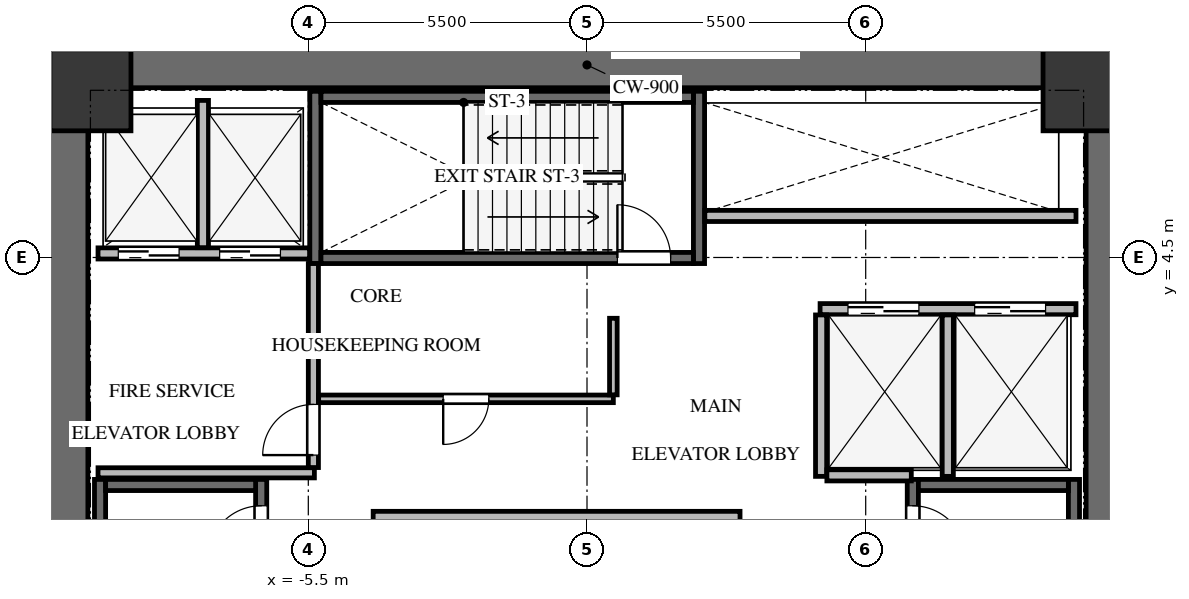
"""IFC4 building model, lengths in metres.
Left out: names, types, materials, properties, quantities, classifications, styles, units other than length and angle.
Written with IfcOpenShell. Run it as: python <this file> out.ifc"""

import sys

from ifc_helpers import new_model, si_unit, direction, frame, frame_2d, origin, origin_2d, place, context, subcontext, project, spatial, rectangle, extrude, source, transform, mapped, element, fill, save


model = new_model("IFC4")
c1 = context("Model", 3, precision=1e-05, world=origin(), true_north=direction((0.0, 1.0)))
c2 = subcontext(c1, "Body", "Model", "MODEL_VIEW")
j1 = project(units=[si_unit("LENGTHUNIT", "METRE"), si_unit("PLANEANGLEUNIT", "RADIAN")], contexts=[c1])
p1 = place(None, origin())
s1 = spatial("IfcSite", under=j1, at=p1, CompositionType="ELEMENT")
p2 = place(p1, origin())
s2 = spatial("IfcBuilding", under=s1, at=p2, CompositionType="ELEMENT")
p3 = place(p2, frame((0.0, 0.0, 84.3)))
s3 = spatial("IfcBuildingStorey", under=s2, at=p3, CompositionType="ELEMENT", Elevation=84.3)
for number, where, z_axis, x_axis in (
    (1, (-10.3, -8.75, 0.0), (0.0, 0.0, 1.0), (0.0, 1.0, 0.0)),
    (2, (10.3, -8.75, 0.0), (0.0, 0.0, 1.0), (0.0, 1.0, 0.0)),
):
    element("IfcWall", number, at=place(p3, frame(where, z_axis=z_axis, x_axis=x_axis)), inside=s3, PredefinedType="SHEAR", context=c2, shape_type="SweptSolid", body=[
        extrude(rectangle(XDim=17.5, YDim=0.9, at=frame_2d((8.75, 0.0))), origin(), (0.0, 0.0, 1.0), 4.2),
    ])
p4 = place(p3, frame((-9.85, 8.3, 0.0), z_axis=(0.0, 0.0, 1.0), x_axis=(1.0, 0.0, 0.0)))
e3 = element("IfcWall", 3, at=p4, inside=s3, PredefinedType="SHEAR", context=c2, shape_type="SweptSolid", body=[
    extrude(rectangle(XDim=19.7, YDim=0.9, at=frame_2d((9.85, 0.0))), origin(), (0.0, 0.0, 1.0), 4.2),
])
p5 = place(p3, frame((-6.43, -7.77, -0.24), z_axis=(0.0, 0.0, 1.0), x_axis=(0.0, 1.0, 0.0)))
e4 = element("IfcWall", 4, at=p5, inside=s3, PredefinedType="SHEAR", context=c2, shape_type="SweptSolid", body=[
    extrude(rectangle(XDim=7.89, YDim=0.22, at=frame_2d((3.945, 0.0))), origin(), (0.0, 0.0, 1.0), 4.14),
])
p6 = place(p5, frame((6.32, 0.0, 0.0)))
e5 = element("IfcOpeningElement", 5, at=p6, cuts=e4, PredefinedType="OPENING", context=c2, shape_type="SweptSolid", body=[
    extrude(rectangle(XDim=1.05, YDim=2.15, at=frame_2d((0.525, 1.075))), frame((0.0, 0.12, 0.0), z_axis=(0.0, -1.0, 0.0), x_axis=(1.0, 0.0, 0.0)), (0.0, 0.0, 1.0), 0.24),
])
p7 = place(p3, frame((-9.61, 0.12, -0.24), z_axis=(0.0, 0.0, 1.0), x_axis=(0.0, -1.0, 0.0)))
e6 = element("IfcWall", 6, at=p7, inside=s3, PredefinedType="SHEAR", context=c2, shape_type="SweptSolid", body=[
    extrude(rectangle(XDim=7.89, YDim=0.22, at=frame_2d((3.945, 0.0))), origin(), (0.0, 0.0, 1.0), 4.14),
])
p8 = place(p3, frame((-6.54, 0.01, -0.24), z_axis=(0.0, 0.0, 1.0), x_axis=(-1.0, 0.0, 0.0)))
e7 = element("IfcWall", 7, at=p8, inside=s3, PredefinedType="SHEAR", context=c2, shape_type="SweptSolid", body=[
    extrude(rectangle(XDim=2.96, YDim=0.22, at=frame_2d((1.48, 0.0))), origin(), (0.0, 0.0, 1.0), 4.14),
])
p9 = place(p3, frame((9.61, -7.77, -0.24), z_axis=(0.0, 0.0, 1.0), x_axis=(0.0, 1.0, 0.0)))
e8 = element("IfcWall", 8, at=p9, inside=s3, PredefinedType="SHEAR", context=c2, shape_type="SweptSolid", body=[
    extrude(rectangle(XDim=7.89, YDim=0.22, at=frame_2d((3.945, 0.0))), origin(), (0.0, 0.0, 1.0), 4.14),
])
p10 = place(p3, frame((6.43, 0.12, -0.24), z_axis=(0.0, 0.0, 1.0), x_axis=(0.0, -1.0, 0.0)))
e9 = element("IfcWall", 9, at=p10, inside=s3, PredefinedType="SHEAR", context=c2, shape_type="SweptSolid", body=[
    extrude(rectangle(XDim=7.89, YDim=0.22, at=frame_2d((3.945, 0.0))), origin(), (0.0, 0.0, 1.0), 4.14),
])
p11 = place(p10, frame((0.52, 0.0, 0.0)))
e10 = element("IfcOpeningElement", 10, at=p11, cuts=e9, PredefinedType="OPENING", context=c2, shape_type="SweptSolid", body=[
    extrude(rectangle(XDim=1.05, YDim=2.15, at=frame_2d((0.525, 1.075))), frame((0.0, 0.12, 0.0), z_axis=(0.0, -1.0, 0.0), x_axis=(1.0, 0.0, 0.0)), (0.0, 0.0, 1.0), 0.24),
])
p12 = place(p3, frame((9.5, 0.01, -0.24), z_axis=(0.0, 0.0, 1.0), x_axis=(-1.0, 0.0, 0.0)))
e11 = element("IfcWall", 11, at=p12, inside=s3, PredefinedType="SHEAR", context=c2, shape_type="SweptSolid", body=[
    extrude(rectangle(XDim=2.96, YDim=0.22, at=frame_2d((1.48, 0.0))), origin(), (0.0, 0.0, 1.0), 4.14),
])
for number, where, z_axis, x_axis in (
    (12, (2.21, 4.38, -0.24), (0.0, 0.0, 1.0), (0.0, 1.0, 0.0)),
    (13, (-5.36, 7.78, -0.24), (0.0, 0.0, 1.0), (0.0, -1.0, 0.0)),
):
    element("IfcWall", number, at=place(p3, frame(where, z_axis=z_axis, x_axis=x_axis)), inside=s3, PredefinedType="SHEAR", context=c2, shape_type="SweptSolid", body=[
        extrude(rectangle(XDim=3.4, YDim=0.22, at=frame_2d((1.7, 0.0))), origin(), (0.0, 0.0, 1.0), 4.14),
    ])
p13 = place(p3, frame((-5.25, 4.49, -0.24), z_axis=(0.0, 0.0, 1.0), x_axis=(1.0, 0.0, 0.0)))
e14 = element("IfcWall", 14, at=p13, inside=s3, PredefinedType="SHEAR", context=c2, shape_type="SweptSolid", body=[
    extrude(rectangle(XDim=7.35, YDim=0.22, at=frame_2d((3.675, 0.0))), origin(), (0.0, 0.0, 1.0), 4.14),
])
p14 = place(p13, frame((5.85, 0.0, 0.0)))
e15 = element("IfcOpeningElement", 15, at=p14, cuts=e14, PredefinedType="OPENING", context=c2, shape_type="SweptSolid", body=[
    extrude(rectangle(XDim=1.05, YDim=2.15, at=frame_2d((0.525, 1.075))), frame((0.0, 0.12, 0.0), z_axis=(0.0, -1.0, 0.0), x_axis=(1.0, 0.0, 0.0)), (0.0, 0.0, 1.0), 0.24),
])
p15 = place(p3, frame((2.1, 7.67, -0.24), z_axis=(0.0, 0.0, 1.0), x_axis=(-1.0, 0.0, 0.0)))
e16 = element("IfcWall", 16, at=p15, inside=s3, PredefinedType="SHEAR", context=c2, shape_type="SweptSolid", body=[
    extrude(rectangle(XDim=7.35, YDim=0.22, at=frame_2d((3.675, 0.0))), origin(), (0.0, 0.0, 1.0), 4.14),
])
m1 = source(origin(), c2, "Body", "SweptSolid", [
    extrude(rectangle(XDim=1.6, YDim=1.6, at=origin_2d()), origin(), (0.0, 0.0, 1.0), 4.14),
])
for number, where, z_axis, x_axis in (
    (17, (9.8, 7.8, -0.24), (0.0, 0.0, 1.0), (1.0, 0.0, 0.0)),
    (18, (-9.8, 7.8, -0.24), (0.0, 0.0, 1.0), (1.0, 0.0, 0.0)),
):
    element("IfcColumn", number, at=place(p3, frame(where, z_axis=z_axis, x_axis=x_axis)), inside=s3, PredefinedType="COLUMN", context=c2, shape_type="MappedRepresentation", body=[
        mapped(m1, transform((0.0, 0.0, 0.0), x_axis=(1.0, 0.0, 0.0), y_axis=(0.0, 1.0, 0.0), z_axis=(0.0, 0.0, 1.0), scale=1.0)),
    ])
p16 = place(p3, frame((-9.65, 4.58, 0.0), z_axis=(0.0, 0.0, 1.0), x_axis=(1.0, 0.0, 0.0)))
e19 = element("IfcWall", 19, at=p16, inside=s3, PredefinedType="SOLIDWALL", context=c2, shape_type="SweptSolid", body=[
    extrude(rectangle(XDim=4.175, YDim=0.22, at=frame_2d((2.087, 0.0))), origin(), (0.0, 0.0, 1.0), 3.885),
])
p17 = place(p16, frame((0.4, 0.0, 0.0)))
e20 = element("IfcOpeningElement", 20, at=p17, cuts=e19, PredefinedType="OPENING", context=c2, shape_type="SweptSolid", body=[
    extrude(rectangle(XDim=1.2, YDim=2.15, at=frame_2d((0.6, 1.075))), frame((0.0, 0.12, 0.0), z_axis=(0.0, -1.0, 0.0), x_axis=(1.0, 0.0, 0.0)), (0.0, 0.0, 1.0), 0.24),
])
p18 = place(p16, frame((2.4, 0.0, 0.0)))
e21 = element("IfcOpeningElement", 21, at=p18, cuts=e19, PredefinedType="OPENING", context=c2, shape_type="SweptSolid", body=[
    extrude(rectangle(XDim=1.2, YDim=2.15, at=frame_2d((0.6, 1.075))), frame((0.0, 0.12, 0.0), z_axis=(0.0, -1.0, 0.0), x_axis=(1.0, 0.0, 0.0)), (0.0, 0.0, 1.0), 0.24),
])
p19 = place(p3, frame((-7.58, 4.694, 0.0), z_axis=(0.0, 0.0, 1.0), x_axis=(0.0, 1.0, 0.0)))
e22 = element("IfcWall", 22, at=p19, inside=s3, PredefinedType="SOLIDWALL", context=c2, shape_type="SweptSolid", body=[
    extrude(rectangle(XDim=2.906, YDim=0.22, at=frame_2d((1.453, 0.0))), origin(), (0.0, 0.0, 1.0), 3.885),
])
p20 = place(p3, frame((-9.65, 0.25, 0.0), z_axis=(0.0, 0.0, 1.0), x_axis=(1.0, 0.0, 0.0)))
e23 = element("IfcWall", 23, at=p20, inside=s3, PredefinedType="SOLIDWALL", context=c2, shape_type="SweptSolid", body=[
    extrude(rectangle(XDim=4.27, YDim=0.2, at=frame_2d((2.135, 0.0))), origin(), (0.0, 0.0, 1.0), 3.885),
])
p21 = place(p3, frame((-5.4, 0.354, 0.0), z_axis=(0.0, 0.0, 1.0), x_axis=(0.0, 1.0, 0.0)))
e24 = element("IfcWall", 24, at=p21, inside=s3, PredefinedType="SOLIDWALL", context=c2, shape_type="SweptSolid", body=[
    extrude(rectangle(XDim=4.026, YDim=0.2, at=frame_2d((2.013, 0.0))), origin(), (0.0, 0.0, 1.0), 3.885),
])
p22 = place(p21, frame((0.246, 0.0, 0.0)))
e25 = element("IfcOpeningElement", 25, at=p22, cuts=e24, PredefinedType="OPENING", context=c2, shape_type="SweptSolid", body=[
    extrude(rectangle(XDim=1.0, YDim=2.15, at=frame_2d((0.5, 1.075))), frame((0.0, 0.11, 0.0), z_axis=(0.0, -1.0, 0.0), x_axis=(1.0, 0.0, 0.0)), (0.0, 0.0, 1.0), 0.22),
])
p23 = place(p3, frame((4.6, 3.48, 0.0), z_axis=(0.0, 0.0, 1.0), x_axis=(1.0, 0.0, 0.0)))
e26 = element("IfcWall", 26, at=p23, inside=s3, PredefinedType="SOLIDWALL", context=c2, shape_type="SweptSolid", body=[
    extrude(rectangle(XDim=5.05, YDim=0.22, at=frame_2d((2.525, 0.0))), origin(), (0.0, 0.0, 1.0), 3.885),
])
p24 = place(p23, frame((0.55, 0.0, 0.0)))
e27 = element("IfcOpeningElement", 27, at=p24, cuts=e26, PredefinedType="OPENING", context=c2, shape_type="SweptSolid", body=[
    extrude(rectangle(XDim=1.4, YDim=2.15, at=frame_2d((0.7, 1.075))), frame((0.0, 0.12, 0.0), z_axis=(0.0, -1.0, 0.0), x_axis=(1.0, 0.0, 0.0)), (0.0, 0.0, 1.0), 0.24),
])
p25 = place(p23, frame((3.05, 0.0, 0.0)))
e28 = element("IfcOpeningElement", 28, at=p25, cuts=e26, PredefinedType="OPENING", context=c2, shape_type="SweptSolid", body=[
    extrude(rectangle(XDim=1.4, YDim=2.15, at=frame_2d((0.7, 1.075))), frame((0.0, 0.12, 0.0), z_axis=(0.0, -1.0, 0.0), x_axis=(1.0, 0.0, 0.0)), (0.0, 0.0, 1.0), 0.24),
])
for number, where, z_axis, x_axis in (
    (29, (4.62, 0.18, 0.0), (0.0, 0.0, 1.0), (0.0, 1.0, 0.0)),
    (30, (7.12, 0.18, 0.0), (0.0, 0.0, 1.0), (0.0, 1.0, 0.0)),
):
    element("IfcWall", number, at=place(p3, frame(where, z_axis=z_axis, x_axis=x_axis)), inside=s3, PredefinedType="SOLIDWALL", context=c2, shape_type="SweptSolid", body=[
        extrude(rectangle(XDim=3.186, YDim=0.22, at=frame_2d((1.593, 0.0))), origin(), (0.0, 0.0, 1.0), 3.885),
    ])
p26 = place(p3, frame((4.734, 0.2, 0.0), z_axis=(0.0, 0.0, 1.0), x_axis=(1.0, 0.0, 0.0)))
e31 = element("IfcWall", 31, at=p26, inside=s3, PredefinedType="SOLIDWALL", context=c2, shape_type="SweptSolid", body=[
    extrude(rectangle(XDim=1.666, YDim=0.22, at=frame_2d((0.833, 0.0))), origin(), (0.0, 0.0, 1.0), 3.885),
])
p27 = place(p3, frame((-4.22, -0.62, 0.0), z_axis=(0.0, 0.0, 1.0), x_axis=(1.0, 0.0, 0.0)))
e32 = element("IfcWall", 32, at=p27, inside=s3, PredefinedType="SOLIDWALL", context=c2, shape_type="SweptSolid", body=[
    extrude(rectangle(XDim=7.24, YDim=0.22, at=frame_2d((3.62, 0.0))), origin(), (0.0, 0.0, 1.0), 3.885),
])
p28 = place(p3, frame((2.325, 5.32, 0.0), z_axis=(0.0, 0.0, 1.0), x_axis=(1.0, 0.0, 0.0)))
e33 = element("IfcWall", 33, at=p28, inside=s3, PredefinedType="SOLIDWALL", context=c2, shape_type="SweptSolid", body=[
    extrude(rectangle(XDim=7.325, YDim=0.22, at=frame_2d((3.663, 0.0))), origin(), (0.0, 0.0, 1.0), 3.885),
])
p29 = place(p3, frame((0.52, 1.71, 0.0), z_axis=(0.0, 0.0, 1.0), x_axis=(-1.0, 0.0, 0.0)))
e34 = element("IfcWall", 34, at=p29, inside=s3, PredefinedType="PARTITIONING", context=c2, shape_type="SweptSolid", body=[
    extrude(rectangle(XDim=5.816, YDim=0.15, at=frame_2d((2.908, 0.0))), origin(), (0.0, 0.0, 1.0), 3.885),
])
p30 = place(p29, frame((2.458, 0.0, 0.0)))
e35 = element("IfcOpeningElement", 35, at=p30, cuts=e34, PredefinedType="OPENING", context=c2, shape_type="SweptSolid", body=[
    extrude(rectangle(XDim=0.9, YDim=2.05, at=frame_2d((0.45, 1.025))), frame((0.0, 0.085, 0.0), z_axis=(0.0, -1.0, 0.0), x_axis=(1.0, 0.0, 0.0)), (0.0, 0.0, 1.0), 0.17),
])
p31 = place(p3, frame((0.52, 3.3, 0.0), z_axis=(0.0, 0.0, 1.0), x_axis=(0.0, -1.0, 0.0)))
e36 = element("IfcWall", 36, at=p31, inside=s3, PredefinedType="PARTITIONING", context=c2, shape_type="SweptSolid", body=[
    extrude(rectangle(XDim=1.511, YDim=0.15, at=frame_2d((0.755, 0.0))), origin(), (0.0, 0.0, 1.0), 3.885),
])
m2 = source(origin(), c2, "Body", "SweptSolid", [
    extrude(rectangle(XDim=1.05, YDim=2.15, at=frame_2d((0.525, 1.075))), frame((0.0, 0.025, 0.0), z_axis=(0.0, -1.0, 0.0), x_axis=(1.0, 0.0, 0.0)), (0.0, 0.0, 1.0), 0.05),
])
p32 = place(p6, origin())
e37 = element("IfcDoor", 37, at=p32, inside=s3, OperationType="SINGLE_SWING_LEFT", PredefinedType="DOOR", context=c2, shape_type="MappedRepresentation", body=[
    mapped(m2, transform((0.0, 0.0, 0.0), x_axis=(1.0, 0.0, 0.0), y_axis=(0.0, 1.0, 0.0), z_axis=(0.0, 0.0, 1.0), scale=1.0)),
])
fill(e5, e37)
m3 = source(origin(), c2, "Body", "SweptSolid", [
    extrude(rectangle(XDim=1.05, YDim=2.15, at=frame_2d((0.525, 1.075))), frame((0.0, 0.025, 0.0), z_axis=(0.0, -1.0, 0.0), x_axis=(1.0, 0.0, 0.0)), (0.0, 0.0, 1.0), 0.05),
])
p33 = place(p11, origin())
e38 = element("IfcDoor", 38, at=p33, inside=s3, OperationType="SINGLE_SWING_RIGHT", PredefinedType="DOOR", context=c2, shape_type="MappedRepresentation", body=[
    mapped(m3, transform((0.0, 0.0, 0.0), x_axis=(1.0, 0.0, 0.0), y_axis=(0.0, 1.0, 0.0), z_axis=(0.0, 0.0, 1.0), scale=1.0)),
])
fill(e10, e38)
p34 = place(p14, origin())
e39 = element("IfcDoor", 39, at=p34, inside=s3, OperationType="SINGLE_SWING_LEFT", PredefinedType="DOOR", context=c2, shape_type="MappedRepresentation", body=[
    mapped(m2, transform((0.0, 0.0, 0.0), x_axis=(1.0, 0.0, 0.0), y_axis=(0.0, 1.0, 0.0), z_axis=(0.0, 0.0, 1.0), scale=1.0)),
])
fill(e15, e39)
m4 = source(origin(), c2, "Body", "SweptSolid", [
    extrude(rectangle(XDim=1.2, YDim=2.15, at=frame_2d((0.6, 1.075))), frame((0.0, 0.025, 0.0), z_axis=(0.0, -1.0, 0.0), x_axis=(1.0, 0.0, 0.0)), (0.0, 0.0, 1.0), 0.05),
])
p35 = place(p17, origin())
e40 = element("IfcDoor", 40, at=p35, inside=s3, OperationType="DOUBLE_DOOR_SLIDING", PredefinedType="DOOR", context=c2, shape_type="MappedRepresentation", body=[
    mapped(m4, transform((0.0, 0.0, 0.0), x_axis=(1.0, 0.0, 0.0), y_axis=(0.0, 1.0, 0.0), z_axis=(0.0, 0.0, 1.0), scale=1.0)),
])
fill(e20, e40)
p36 = place(p18, origin())
e41 = element("IfcDoor", 41, at=p36, inside=s3, OperationType="DOUBLE_DOOR_SLIDING", PredefinedType="DOOR", context=c2, shape_type="MappedRepresentation", body=[
    mapped(m4, transform((0.0, 0.0, 0.0), x_axis=(1.0, 0.0, 0.0), y_axis=(0.0, 1.0, 0.0), z_axis=(0.0, 0.0, 1.0), scale=1.0)),
])
fill(e21, e41)
m5 = source(origin(), c2, "Body", "SweptSolid", [
    extrude(rectangle(XDim=1.0, YDim=2.15, at=frame_2d((0.5, 1.075))), frame((0.0, 0.025, 0.0), z_axis=(0.0, -1.0, 0.0), x_axis=(1.0, 0.0, 0.0)), (0.0, 0.0, 1.0), 0.05),
])
p37 = place(p22, origin())
e42 = element("IfcDoor", 42, at=p37, inside=s3, OperationType="SINGLE_SWING_LEFT", PredefinedType="DOOR", context=c2, shape_type="MappedRepresentation", body=[
    mapped(m5, transform((0.0, 0.0, 0.0), x_axis=(1.0, 0.0, 0.0), y_axis=(0.0, 1.0, 0.0), z_axis=(0.0, 0.0, 1.0), scale=1.0)),
])
fill(e25, e42)
m6 = source(origin(), c2, "Body", "SweptSolid", [
    extrude(rectangle(XDim=1.4, YDim=2.15, at=frame_2d((0.7, 1.075))), frame((0.0, 0.025, 0.0), z_axis=(0.0, -1.0, 0.0), x_axis=(1.0, 0.0, 0.0)), (0.0, 0.0, 1.0), 0.05),
])
p38 = place(p24, origin())
e43 = element("IfcDoor", 43, at=p38, inside=s3, OperationType="DOUBLE_DOOR_SLIDING", PredefinedType="DOOR", context=c2, shape_type="MappedRepresentation", body=[
    mapped(m6, transform((0.0, 0.0, 0.0), x_axis=(1.0, 0.0, 0.0), y_axis=(0.0, 1.0, 0.0), z_axis=(0.0, 0.0, 1.0), scale=1.0)),
])
fill(e27, e43)
p39 = place(p25, origin())
e44 = element("IfcDoor", 44, at=p39, inside=s3, OperationType="DOUBLE_DOOR_SLIDING", PredefinedType="DOOR", context=c2, shape_type="MappedRepresentation", body=[
    mapped(m6, transform((0.0, 0.0, 0.0), x_axis=(1.0, 0.0, 0.0), y_axis=(0.0, 1.0, 0.0), z_axis=(0.0, 0.0, 1.0), scale=1.0)),
])
fill(e28, e44)
m7 = source(origin(), c2, "Body", "SweptSolid", [
    extrude(rectangle(XDim=0.9, YDim=2.05, at=frame_2d((0.45, 1.025))), frame((0.0, 0.025, 0.0), z_axis=(0.0, -1.0, 0.0), x_axis=(1.0, 0.0, 0.0)), (0.0, 0.0, 1.0), 0.05),
])
p40 = place(p30, origin())
e45 = element("IfcDoor", 45, at=p40, inside=s3, OperationType="SINGLE_SWING_RIGHT", PredefinedType="DOOR", context=c2, shape_type="MappedRepresentation", body=[
    mapped(m7, transform((0.0, 0.0, 0.0), x_axis=(1.0, 0.0, 0.0), y_axis=(0.0, 1.0, 0.0), z_axis=(0.0, 0.0, 1.0), scale=1.0)),
])
fill(e35, e45)
save(model, sys.argv[1])
